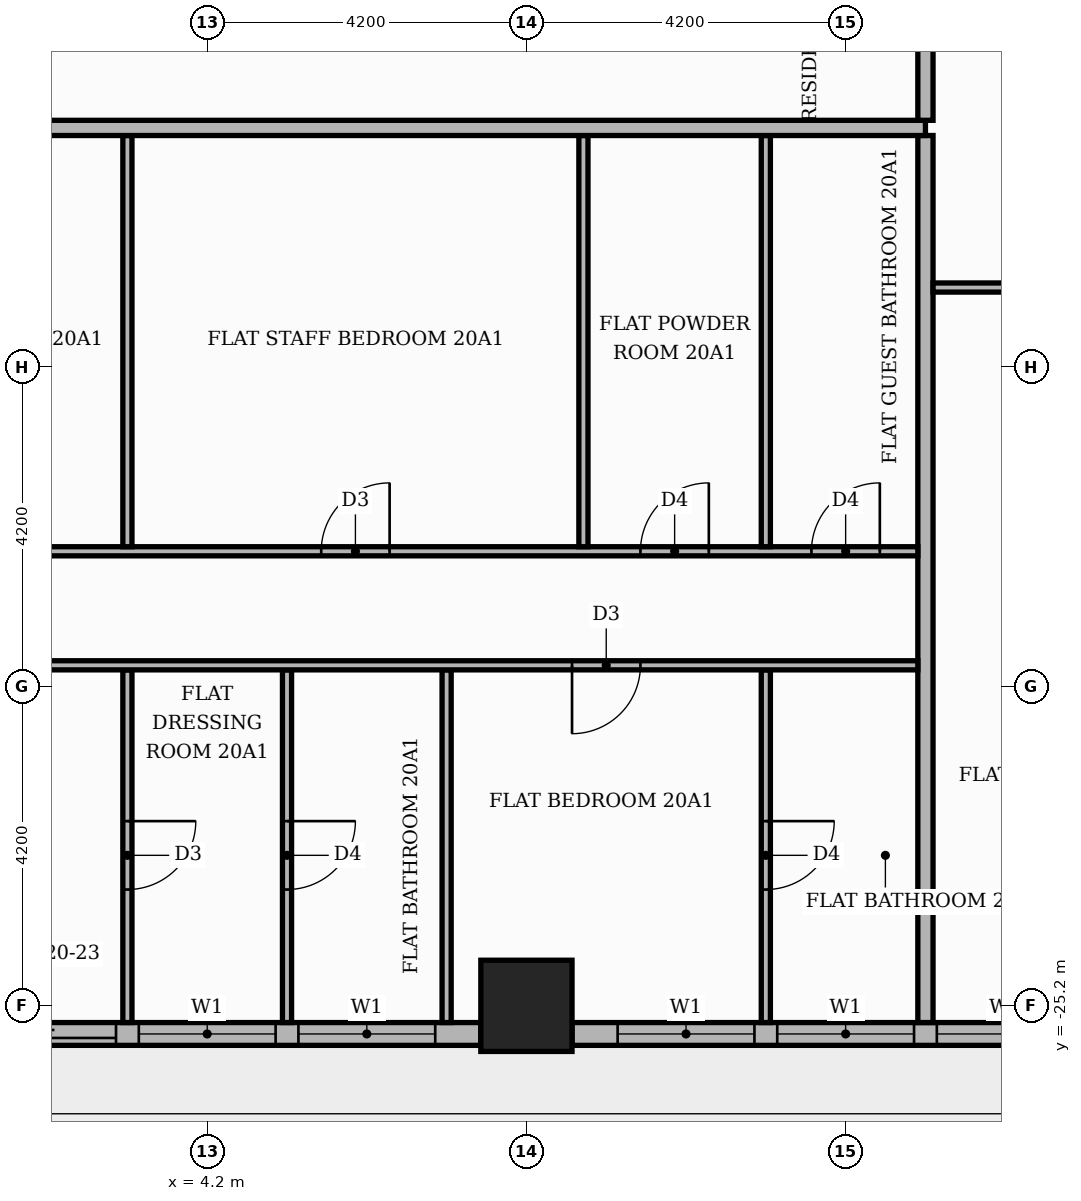
"""IFC4 building model, lengths in metres.
Left out: names, types, materials, properties, quantities, classifications, styles, units other than length and angle.
Written with IfcOpenShell. Run it as: python <this file> out.ifc"""

import sys

from ifc_helpers import new_model, si_unit, direction, frame, frame_2d, origin, origin_2d, place, context, subcontext, project, spatial, rectangle, extrude, element, fill, save


model = new_model("IFC4")
c1 = context("Model", 3, precision=1e-05, world=origin(), true_north=direction((0.0, 1.0)))
c2 = subcontext(c1, "Body", "Model", "MODEL_VIEW")
j1 = project(units=[si_unit("LENGTHUNIT", "METRE"), si_unit("PLANEANGLEUNIT", "RADIAN")], contexts=[c1])
p1 = place(None, origin())
s1 = spatial("IfcSite", under=j1, at=p1, CompositionType="ELEMENT")
p2 = place(p1, origin())
s2 = spatial("IfcBuilding", under=s1, at=p2, CompositionType="ELEMENT")
p3 = place(p2, frame((0.0, 0.0, 87.0)))
s3 = spatial("IfcBuildingStorey", under=s2, at=p3, CompositionType="ELEMENT", Elevation=87.0)
p4 = place(p3, frame((8.4, -25.2, 0.0), z_axis=(0.0, 0.0, 1.0), x_axis=(1.0, 0.0, 0.0)))
e1 = element("IfcColumn", 1, at=p4, inside=s3, PredefinedType="COLUMN", context=c2, shape_type="SweptSolid", body=[
    extrude(rectangle(XDim=1.2, YDim=1.2, at=origin_2d()), origin(), (0.0, 0.0, 1.0), 3.9),
])
p5 = place(p3, frame((0.6, -25.57, 0.0), z_axis=(0.0, 0.0, 1.0), x_axis=(1.0, 0.0, 0.0)))
e2 = element("IfcWall", 2, at=p5, inside=s3, PredefinedType="STANDARD", context=c2, shape_type="SweptSolid", body=[
    extrude(rectangle(XDim=7.2, YDim=0.3, at=frame_2d((3.6, 0.0))), origin(), (0.0, 0.0, 1.0), 3.48),
])
p6 = place(p5, frame((0.6, 0.0, 0.0)))
e3 = element("IfcOpeningElement", 3, at=p6, cuts=e2, PredefinedType="OPENING", context=c2, shape_type="SweptSolid", body=[
    extrude(rectangle(XDim=1.8, YDim=2.4, at=frame_2d((0.9, 1.2))), frame((0.0, 0.16, 0.0), z_axis=(0.0, -1.0, 0.0), x_axis=(1.0, 0.0, 0.0)), (0.0, 0.0, 1.0), 0.32),
])
p7 = place(p5, frame((2.7, 0.0, 0.9)))
e4 = element("IfcOpeningElement", 4, at=p7, cuts=e2, PredefinedType="OPENING", context=c2, shape_type="SweptSolid", body=[
    extrude(rectangle(XDim=1.8, YDim=2.1, at=frame_2d((0.9, 1.05))), frame((0.0, 0.16, 0.0), z_axis=(0.0, -1.0, 0.0), x_axis=(1.0, 0.0, 0.0)), (0.0, 0.0, 1.0), 0.32),
])
p8 = place(p5, frame((4.8, 0.0, 0.9)))
e5 = element("IfcOpeningElement", 5, at=p8, cuts=e2, PredefinedType="OPENING", context=c2, shape_type="SweptSolid", body=[
    extrude(rectangle(XDim=1.8, YDim=2.1, at=frame_2d((0.9, 1.05))), frame((0.0, 0.16, 0.0), z_axis=(0.0, -1.0, 0.0), x_axis=(1.0, 0.0, 0.0)), (0.0, 0.0, 1.0), 0.32),
])
p9 = place(p3, frame((9.0, -25.57, 0.0), z_axis=(0.0, 0.0, 1.0), x_axis=(1.0, 0.0, 0.0)))
e6 = element("IfcWall", 6, at=p9, inside=s3, PredefinedType="STANDARD", context=c2, shape_type="SweptSolid", body=[
    extrude(rectangle(XDim=7.2, YDim=0.3, at=frame_2d((3.6, 0.0))), origin(), (0.0, 0.0, 1.0), 3.48),
])
p10 = place(p9, frame((0.6, 0.0, 0.9)))
e7 = element("IfcOpeningElement", 7, at=p10, cuts=e6, PredefinedType="OPENING", context=c2, shape_type="SweptSolid", body=[
    extrude(rectangle(XDim=1.8, YDim=2.1, at=frame_2d((0.9, 1.05))), frame((0.0, 0.16, 0.0), z_axis=(0.0, -1.0, 0.0), x_axis=(1.0, 0.0, 0.0)), (0.0, 0.0, 1.0), 0.32),
])
p11 = place(p9, frame((2.7, 0.0, 0.9)))
e8 = element("IfcOpeningElement", 8, at=p11, cuts=e6, PredefinedType="OPENING", context=c2, shape_type="SweptSolid", body=[
    extrude(rectangle(XDim=1.8, YDim=2.1, at=frame_2d((0.9, 1.05))), frame((0.0, 0.16, 0.0), z_axis=(0.0, -1.0, 0.0), x_axis=(1.0, 0.0, 0.0)), (0.0, 0.0, 1.0), 0.32),
])
p12 = place(p9, frame((4.8, 0.0, 0.9)))
e9 = element("IfcOpeningElement", 9, at=p12, cuts=e6, PredefinedType="OPENING", context=c2, shape_type="SweptSolid", body=[
    extrude(rectangle(XDim=1.8, YDim=2.1, at=frame_2d((0.9, 1.05))), frame((0.0, 0.16, 0.0), z_axis=(0.0, -1.0, 0.0), x_axis=(1.0, 0.0, 0.0)), (0.0, 0.0, 1.0), 0.32),
])
p13 = place(p3, frame((3.15, -25.42, 0.0), z_axis=(0.0, 0.0, 1.0), x_axis=(0.0, 1.0, 0.0)))
e10 = element("IfcWall", 10, at=p13, inside=s3, PredefinedType="PARTITIONING", context=c2, shape_type="SweptSolid", body=[
    extrude(rectangle(XDim=4.64, YDim=0.12, at=frame_2d((2.32, 0.0))), origin(), (0.0, 0.0, 1.0), 3.48),
])
p14 = place(p13, frame((1.75, 0.0, 0.0)))
e11 = element("IfcOpeningElement", 11, at=p14, cuts=e10, PredefinedType="OPENING", context=c2, shape_type="SweptSolid", body=[
    extrude(rectangle(XDim=0.9, YDim=2.1, at=frame_2d((0.45, 1.05))), frame((0.0, 0.07, 0.0), z_axis=(0.0, -1.0, 0.0), x_axis=(1.0, 0.0, 0.0)), (0.0, 0.0, 1.0), 0.14),
])
p15 = place(p3, frame((5.25, -25.42, 0.0), z_axis=(0.0, 0.0, 1.0), x_axis=(0.0, 1.0, 0.0)))
e12 = element("IfcWall", 12, at=p15, inside=s3, PredefinedType="PARTITIONING", context=c2, shape_type="SweptSolid", body=[
    extrude(rectangle(XDim=4.64, YDim=0.12, at=frame_2d((2.32, 0.0))), origin(), (0.0, 0.0, 1.0), 3.48),
])
p16 = place(p15, frame((1.75, 0.0, 0.0)))
e13 = element("IfcOpeningElement", 13, at=p16, cuts=e12, PredefinedType="OPENING", context=c2, shape_type="SweptSolid", body=[
    extrude(rectangle(XDim=0.9, YDim=2.1, at=frame_2d((0.45, 1.05))), frame((0.0, 0.07, 0.0), z_axis=(0.0, -1.0, 0.0), x_axis=(1.0, 0.0, 0.0)), (0.0, 0.0, 1.0), 0.14),
])
p17 = place(p3, frame((7.35, -25.42, 0.0), z_axis=(0.0, 0.0, 1.0), x_axis=(0.0, 1.0, 0.0)))
e14 = element("IfcWall", 14, at=p17, inside=s3, PredefinedType="PARTITIONING", context=c2, shape_type="SweptSolid", body=[
    extrude(rectangle(XDim=4.64, YDim=0.12, at=frame_2d((2.32, 0.0))), origin(), (0.0, 0.0, 1.0), 3.48),
])
p18 = place(p3, frame((11.55, -25.42, 0.0), z_axis=(0.0, 0.0, 1.0), x_axis=(0.0, 1.0, 0.0)))
e15 = element("IfcWall", 15, at=p18, inside=s3, PredefinedType="PARTITIONING", context=c2, shape_type="SweptSolid", body=[
    extrude(rectangle(XDim=4.64, YDim=0.12, at=frame_2d((2.32, 0.0))), origin(), (0.0, 0.0, 1.0), 3.48),
])
p19 = place(p18, frame((1.75, 0.0, 0.0)))
e16 = element("IfcOpeningElement", 16, at=p19, cuts=e15, PredefinedType="OPENING", context=c2, shape_type="SweptSolid", body=[
    extrude(rectangle(XDim=0.9, YDim=2.1, at=frame_2d((0.45, 1.05))), frame((0.0, 0.07, 0.0), z_axis=(0.0, -1.0, 0.0), x_axis=(1.0, 0.0, 0.0)), (0.0, 0.0, 1.0), 0.14),
])
p20 = place(p3, frame((13.65, -25.42, 0.0), z_axis=(0.0, 0.0, 1.0), x_axis=(0.0, 1.0, 0.0)))
e17 = element("IfcWall", 17, at=p20, inside=s3, PredefinedType="PARTITIONING", context=c2, shape_type="SweptSolid", body=[
    extrude(rectangle(XDim=11.67, YDim=0.2, at=frame_2d((5.835, 0.0))), origin(), (0.0, 0.0, 1.0), 3.48),
])
p21 = place(p3, frame((-25.42, -20.72, 0.0), z_axis=(0.0, 0.0, 1.0), x_axis=(1.0, 0.0, 0.0)))
e18 = element("IfcWall", 18, at=p21, inside=s3, PredefinedType="PARTITIONING", context=c2, shape_type="SweptSolid", body=[
    extrude(rectangle(XDim=38.97, YDim=0.12, at=frame_2d((19.485, 0.0))), origin(), (0.0, 0.0, 1.0), 3.48),
])
p22 = place(p21, frame((12.32, 0.0, 0.0)))
e19 = element("IfcOpeningElement", 19, at=p22, cuts=e18, PredefinedType="OPENING", context=c2, shape_type="SweptSolid", body=[
    extrude(rectangle(XDim=1.0, YDim=2.1, at=frame_2d((0.5, 1.05))), frame((0.0, 0.07, 0.0), z_axis=(0.0, -1.0, 0.0), x_axis=(1.0, 0.0, 0.0)), (0.0, 0.0, 1.0), 0.14),
])
p23 = place(p21, frame((16.52, 0.0, 0.0)))
e20 = element("IfcOpeningElement", 20, at=p23, cuts=e18, PredefinedType="OPENING", context=c2, shape_type="SweptSolid", body=[
    extrude(rectangle(XDim=1.0, YDim=2.1, at=frame_2d((0.5, 1.05))), frame((0.0, 0.07, 0.0), z_axis=(0.0, -1.0, 0.0), x_axis=(1.0, 0.0, 0.0)), (0.0, 0.0, 1.0), 0.14),
])
p24 = place(p21, frame((23.92, 0.0, 0.0)))
e21 = element("IfcOpeningElement", 21, at=p24, cuts=e18, PredefinedType="OPENING", context=c2, shape_type="SweptSolid", body=[
    extrude(rectangle(XDim=0.9, YDim=2.1, at=frame_2d((0.45, 1.05))), frame((0.0, 0.07, 0.0), z_axis=(0.0, -1.0, 0.0), x_axis=(1.0, 0.0, 0.0)), (0.0, 0.0, 1.0), 0.14),
])
p25 = place(p21, frame((34.42, 0.0, 0.0)))
e22 = element("IfcOpeningElement", 22, at=p25, cuts=e18, PredefinedType="OPENING", context=c2, shape_type="SweptSolid", body=[
    extrude(rectangle(XDim=0.9, YDim=2.1, at=frame_2d((0.45, 1.05))), frame((0.0, 0.07, 0.0), z_axis=(0.0, -1.0, 0.0), x_axis=(1.0, 0.0, 0.0)), (0.0, 0.0, 1.0), 0.14),
])
p26 = place(p3, frame((-7.35, -19.22, 0.0), z_axis=(0.0, 0.0, 1.0), x_axis=(1.0, 0.0, 0.0)))
e23 = element("IfcWall", 23, at=p26, inside=s3, PredefinedType="PARTITIONING", context=c2, shape_type="SweptSolid", body=[
    extrude(rectangle(XDim=20.9, YDim=0.12, at=frame_2d((10.45, 0.0))), origin(), (0.0, 0.0, 1.0), 3.48),
])
p27 = place(p26, frame((2.7, 0.0, 0.0)))
e24 = element("IfcOpeningElement", 24, at=p27, cuts=e23, PredefinedType="OPENING", context=c2, shape_type="SweptSolid", body=[
    extrude(rectangle(XDim=0.9, YDim=2.1, at=frame_2d((0.45, 1.05))), frame((0.0, 0.07, 0.0), z_axis=(0.0, -1.0, 0.0), x_axis=(1.0, 0.0, 0.0)), (0.0, 0.0, 1.0), 0.14),
])
p28 = place(p26, frame((7.95, 0.0, 0.0)))
e25 = element("IfcOpeningElement", 25, at=p28, cuts=e23, PredefinedType="OPENING", context=c2, shape_type="SweptSolid", body=[
    extrude(rectangle(XDim=0.9, YDim=2.1, at=frame_2d((0.45, 1.05))), frame((0.0, 0.07, 0.0), z_axis=(0.0, -1.0, 0.0), x_axis=(1.0, 0.0, 0.0)), (0.0, 0.0, 1.0), 0.14),
])
p29 = place(p26, frame((13.05, 0.0, 0.0)))
e26 = element("IfcOpeningElement", 26, at=p29, cuts=e23, PredefinedType="OPENING", context=c2, shape_type="SweptSolid", body=[
    extrude(rectangle(XDim=0.9, YDim=2.1, at=frame_2d((0.45, 1.05))), frame((0.0, 0.07, 0.0), z_axis=(0.0, -1.0, 0.0), x_axis=(1.0, 0.0, 0.0)), (0.0, 0.0, 1.0), 0.14),
])
p30 = place(p26, frame((17.25, 0.0, 0.0)))
e27 = element("IfcOpeningElement", 27, at=p30, cuts=e23, PredefinedType="OPENING", context=c2, shape_type="SweptSolid", body=[
    extrude(rectangle(XDim=0.9, YDim=2.1, at=frame_2d((0.45, 1.05))), frame((0.0, 0.07, 0.0), z_axis=(0.0, -1.0, 0.0), x_axis=(1.0, 0.0, 0.0)), (0.0, 0.0, 1.0), 0.14),
])
p31 = place(p26, frame((19.5, 0.0, 0.0)))
e28 = element("IfcOpeningElement", 28, at=p31, cuts=e23, PredefinedType="OPENING", context=c2, shape_type="SweptSolid", body=[
    extrude(rectangle(XDim=0.9, YDim=2.1, at=frame_2d((0.45, 1.05))), frame((0.0, 0.07, 0.0), z_axis=(0.0, -1.0, 0.0), x_axis=(1.0, 0.0, 0.0)), (0.0, 0.0, 1.0), 0.14),
])
for number, where, z_axis, x_axis in (
    (29, (3.15, -19.16, 0.0), (0.0, 0.0, 1.0), (0.0, 1.0, 0.0)),
    (30, (9.15, -19.16, 0.0), (0.0, 0.0, 1.0), (0.0, 1.0, 0.0)),
    (31, (11.55, -19.16, 0.0), (0.0, 0.0, 1.0), (0.0, 1.0, 0.0)),
):
    element("IfcWall", number, at=place(p3, frame(where, z_axis=z_axis, x_axis=x_axis)), inside=s3, PredefinedType="PARTITIONING", context=c2, shape_type="SweptSolid", body=[
        extrude(rectangle(XDim=5.41, YDim=0.12, at=frame_2d((2.705, 0.0))), origin(), (0.0, 0.0, 1.0), 3.48),
    ])
p32 = place(p3, frame((13.75, -15.75, 0.0), z_axis=(0.0, 0.0, 1.0), x_axis=(1.0, 0.0, 0.0)))
e32 = element("IfcWall", 32, at=p32, inside=s3, PredefinedType="PARTITIONING", context=c2, shape_type="SweptSolid", body=[
    extrude(rectangle(XDim=6.67, YDim=0.12, at=frame_2d((3.335, 0.0))), origin(), (0.0, 0.0, 1.0), 3.48),
])
p33 = place(p32, frame((2.785, 0.0, 0.0)))
e33 = element("IfcOpeningElement", 33, at=p33, cuts=e32, PredefinedType="OPENING", context=c2, shape_type="SweptSolid", body=[
    extrude(rectangle(XDim=1.0, YDim=2.1, at=frame_2d((0.5, 1.05))), frame((0.0, 0.07, 0.0), z_axis=(0.0, -1.0, 0.0), x_axis=(1.0, 0.0, 0.0)), (0.0, 0.0, 1.0), 0.14),
])
p34 = place(p3, frame((-25.42, -13.65, 0.0), z_axis=(0.0, 0.0, 1.0), x_axis=(1.0, 0.0, 0.0)))
e34 = element("IfcWall", 34, at=p34, inside=s3, PredefinedType="PARTITIONING", context=c2, shape_type="SweptSolid", body=[
    extrude(rectangle(XDim=39.07, YDim=0.2, at=frame_2d((19.535, 0.0))), origin(), (0.0, 0.0, 1.0), 3.48),
])
p35 = place(p34, frame((14.37, 0.0, 0.0)))
e35 = element("IfcOpeningElement", 35, at=p35, cuts=e34, PredefinedType="OPENING", context=c2, shape_type="SweptSolid", body=[
    extrude(rectangle(XDim=1.1, YDim=2.4, at=frame_2d((0.55, 1.2))), frame((0.0, 0.11, 0.0), z_axis=(0.0, -1.0, 0.0), x_axis=(1.0, 0.0, 0.0)), (0.0, 0.0, 1.0), 0.22),
])
p36 = place(p3, frame((13.65, -13.55, 0.0), z_axis=(0.0, 0.0, 1.0), x_axis=(0.0, 1.0, 0.0)))
e36 = element("IfcWall", 36, at=p36, inside=s3, PredefinedType="PARTITIONING", context=c2, shape_type="SweptSolid", body=[
    extrude(rectangle(XDim=8.2, YDim=0.2, at=frame_2d((4.1, 0.0))), origin(), (0.0, 0.0, 1.0), 3.48),
])
p37 = place(p36, frame((1.45, 0.0, 0.0)))
e37 = element("IfcOpeningElement", 37, at=p37, cuts=e36, PredefinedType="OPENING", context=c2, shape_type="SweptSolid", body=[
    extrude(rectangle(XDim=1.1, YDim=2.4, at=frame_2d((0.55, 1.2))), frame((0.0, 0.11, 0.0), z_axis=(0.0, -1.0, 0.0), x_axis=(1.0, 0.0, 0.0)), (0.0, 0.0, 1.0), 0.22),
])
p38 = place(p6, origin())
e38 = element("IfcDoor", 38, at=p38, inside=s3, OperationType="SLIDING_TO_LEFT", PredefinedType="DOOR", context=c2, shape_type="SweptSolid", body=[
    extrude(rectangle(XDim=1.8, YDim=2.4, at=frame_2d((0.9, 1.2))), frame((0.0, 0.025, 0.0), z_axis=(0.0, -1.0, 0.0), x_axis=(1.0, 0.0, 0.0)), (0.0, 0.0, 1.0), 0.05),
])
fill(e3, e38)
p39 = place(p7, origin())
e39 = element("IfcWindow", 39, at=p39, inside=s3, PartitioningType="SINGLE_PANEL", PredefinedType="WINDOW", context=c2, shape_type="SweptSolid", body=[
    extrude(rectangle(XDim=1.8, YDim=2.1, at=frame_2d((0.9, 1.05))), frame((0.0, 0.03, 0.0), z_axis=(0.0, -1.0, 0.0), x_axis=(1.0, 0.0, 0.0)), (0.0, 0.0, 1.0), 0.06),
])
fill(e4, e39)
p40 = place(p8, origin())
e40 = element("IfcWindow", 40, at=p40, inside=s3, PartitioningType="SINGLE_PANEL", PredefinedType="WINDOW", context=c2, shape_type="SweptSolid", body=[
    extrude(rectangle(XDim=1.8, YDim=2.1, at=frame_2d((0.9, 1.05))), frame((0.0, 0.03, 0.0), z_axis=(0.0, -1.0, 0.0), x_axis=(1.0, 0.0, 0.0)), (0.0, 0.0, 1.0), 0.06),
])
fill(e5, e40)
p41 = place(p10, origin())
e41 = element("IfcWindow", 41, at=p41, inside=s3, PartitioningType="SINGLE_PANEL", PredefinedType="WINDOW", context=c2, shape_type="SweptSolid", body=[
    extrude(rectangle(XDim=1.8, YDim=2.1, at=frame_2d((0.9, 1.05))), frame((0.0, 0.03, 0.0), z_axis=(0.0, -1.0, 0.0), x_axis=(1.0, 0.0, 0.0)), (0.0, 0.0, 1.0), 0.06),
])
fill(e7, e41)
p42 = place(p11, origin())
e42 = element("IfcWindow", 42, at=p42, inside=s3, PartitioningType="SINGLE_PANEL", PredefinedType="WINDOW", context=c2, shape_type="SweptSolid", body=[
    extrude(rectangle(XDim=1.8, YDim=2.1, at=frame_2d((0.9, 1.05))), frame((0.0, 0.03, 0.0), z_axis=(0.0, -1.0, 0.0), x_axis=(1.0, 0.0, 0.0)), (0.0, 0.0, 1.0), 0.06),
])
fill(e8, e42)
p43 = place(p12, origin())
e43 = element("IfcWindow", 43, at=p43, inside=s3, PartitioningType="SINGLE_PANEL", PredefinedType="WINDOW", context=c2, shape_type="SweptSolid", body=[
    extrude(rectangle(XDim=1.8, YDim=2.1, at=frame_2d((0.9, 1.05))), frame((0.0, 0.03, 0.0), z_axis=(0.0, -1.0, 0.0), x_axis=(1.0, 0.0, 0.0)), (0.0, 0.0, 1.0), 0.06),
])
fill(e9, e43)
p44 = place(p29, origin())
e44 = element("IfcDoor", 44, at=p44, inside=s3, OperationType="SINGLE_SWING_RIGHT", PredefinedType="DOOR", context=c2, shape_type="SweptSolid", body=[
    extrude(rectangle(XDim=0.9, YDim=2.1, at=frame_2d((0.45, 1.05))), frame((0.0, 0.025, 0.0), z_axis=(0.0, -1.0, 0.0), x_axis=(1.0, 0.0, 0.0)), (0.0, 0.0, 1.0), 0.05),
])
fill(e26, e44)
p45 = place(p30, origin())
e45 = element("IfcDoor", 45, at=p45, inside=s3, OperationType="SINGLE_SWING_RIGHT", PredefinedType="DOOR", context=c2, shape_type="SweptSolid", body=[
    extrude(rectangle(XDim=0.9, YDim=2.1, at=frame_2d((0.45, 1.05))), frame((0.0, 0.025, 0.0), z_axis=(0.0, -1.0, 0.0), x_axis=(1.0, 0.0, 0.0)), (0.0, 0.0, 1.0), 0.05),
])
fill(e27, e45)
p46 = place(p31, origin())
e46 = element("IfcDoor", 46, at=p46, inside=s3, OperationType="SINGLE_SWING_RIGHT", PredefinedType="DOOR", context=c2, shape_type="SweptSolid", body=[
    extrude(rectangle(XDim=0.9, YDim=2.1, at=frame_2d((0.45, 1.05))), frame((0.0, 0.025, 0.0), z_axis=(0.0, -1.0, 0.0), x_axis=(1.0, 0.0, 0.0)), (0.0, 0.0, 1.0), 0.05),
])
fill(e28, e46)
p47 = place(p14, frame((0.9, 0.0, 0.0), z_axis=(0.0, 0.0, 1.0), x_axis=(-1.0, 0.0, 0.0)))
e47 = element("IfcDoor", 47, at=p47, inside=s3, OperationType="SINGLE_SWING_RIGHT", PredefinedType="DOOR", context=c2, shape_type="SweptSolid", body=[
    extrude(rectangle(XDim=0.9, YDim=2.1, at=frame_2d((0.45, 1.05))), frame((0.0, 0.025, 0.0), z_axis=(0.0, -1.0, 0.0), x_axis=(1.0, 0.0, 0.0)), (0.0, 0.0, 1.0), 0.05),
])
fill(e11, e47)
p48 = place(p16, frame((0.9, 0.0, 0.0), z_axis=(0.0, 0.0, 1.0), x_axis=(-1.0, 0.0, 0.0)))
e48 = element("IfcDoor", 48, at=p48, inside=s3, OperationType="SINGLE_SWING_RIGHT", PredefinedType="DOOR", context=c2, shape_type="SweptSolid", body=[
    extrude(rectangle(XDim=0.9, YDim=2.1, at=frame_2d((0.45, 1.05))), frame((0.0, 0.025, 0.0), z_axis=(0.0, -1.0, 0.0), x_axis=(1.0, 0.0, 0.0)), (0.0, 0.0, 1.0), 0.05),
])
fill(e13, e48)
p49 = place(p25, frame((0.9, 0.0, 0.0), z_axis=(0.0, 0.0, 1.0), x_axis=(-1.0, 0.0, 0.0)))
e49 = element("IfcDoor", 49, at=p49, inside=s3, OperationType="SINGLE_SWING_LEFT", PredefinedType="DOOR", context=c2, shape_type="SweptSolid", body=[
    extrude(rectangle(XDim=0.9, YDim=2.1, at=frame_2d((0.45, 1.05))), frame((0.0, 0.025, 0.0), z_axis=(0.0, -1.0, 0.0), x_axis=(1.0, 0.0, 0.0)), (0.0, 0.0, 1.0), 0.05),
])
fill(e22, e49)
p50 = place(p19, frame((0.9, 0.0, 0.0), z_axis=(0.0, 0.0, 1.0), x_axis=(-1.0, 0.0, 0.0)))
e50 = element("IfcDoor", 50, at=p50, inside=s3, OperationType="SINGLE_SWING_RIGHT", PredefinedType="DOOR", context=c2, shape_type="SweptSolid", body=[
    extrude(rectangle(XDim=0.9, YDim=2.1, at=frame_2d((0.45, 1.05))), frame((0.0, 0.025, 0.0), z_axis=(0.0, -1.0, 0.0), x_axis=(1.0, 0.0, 0.0)), (0.0, 0.0, 1.0), 0.05),
])
fill(e16, e50)
save(model, sys.argv[1])
